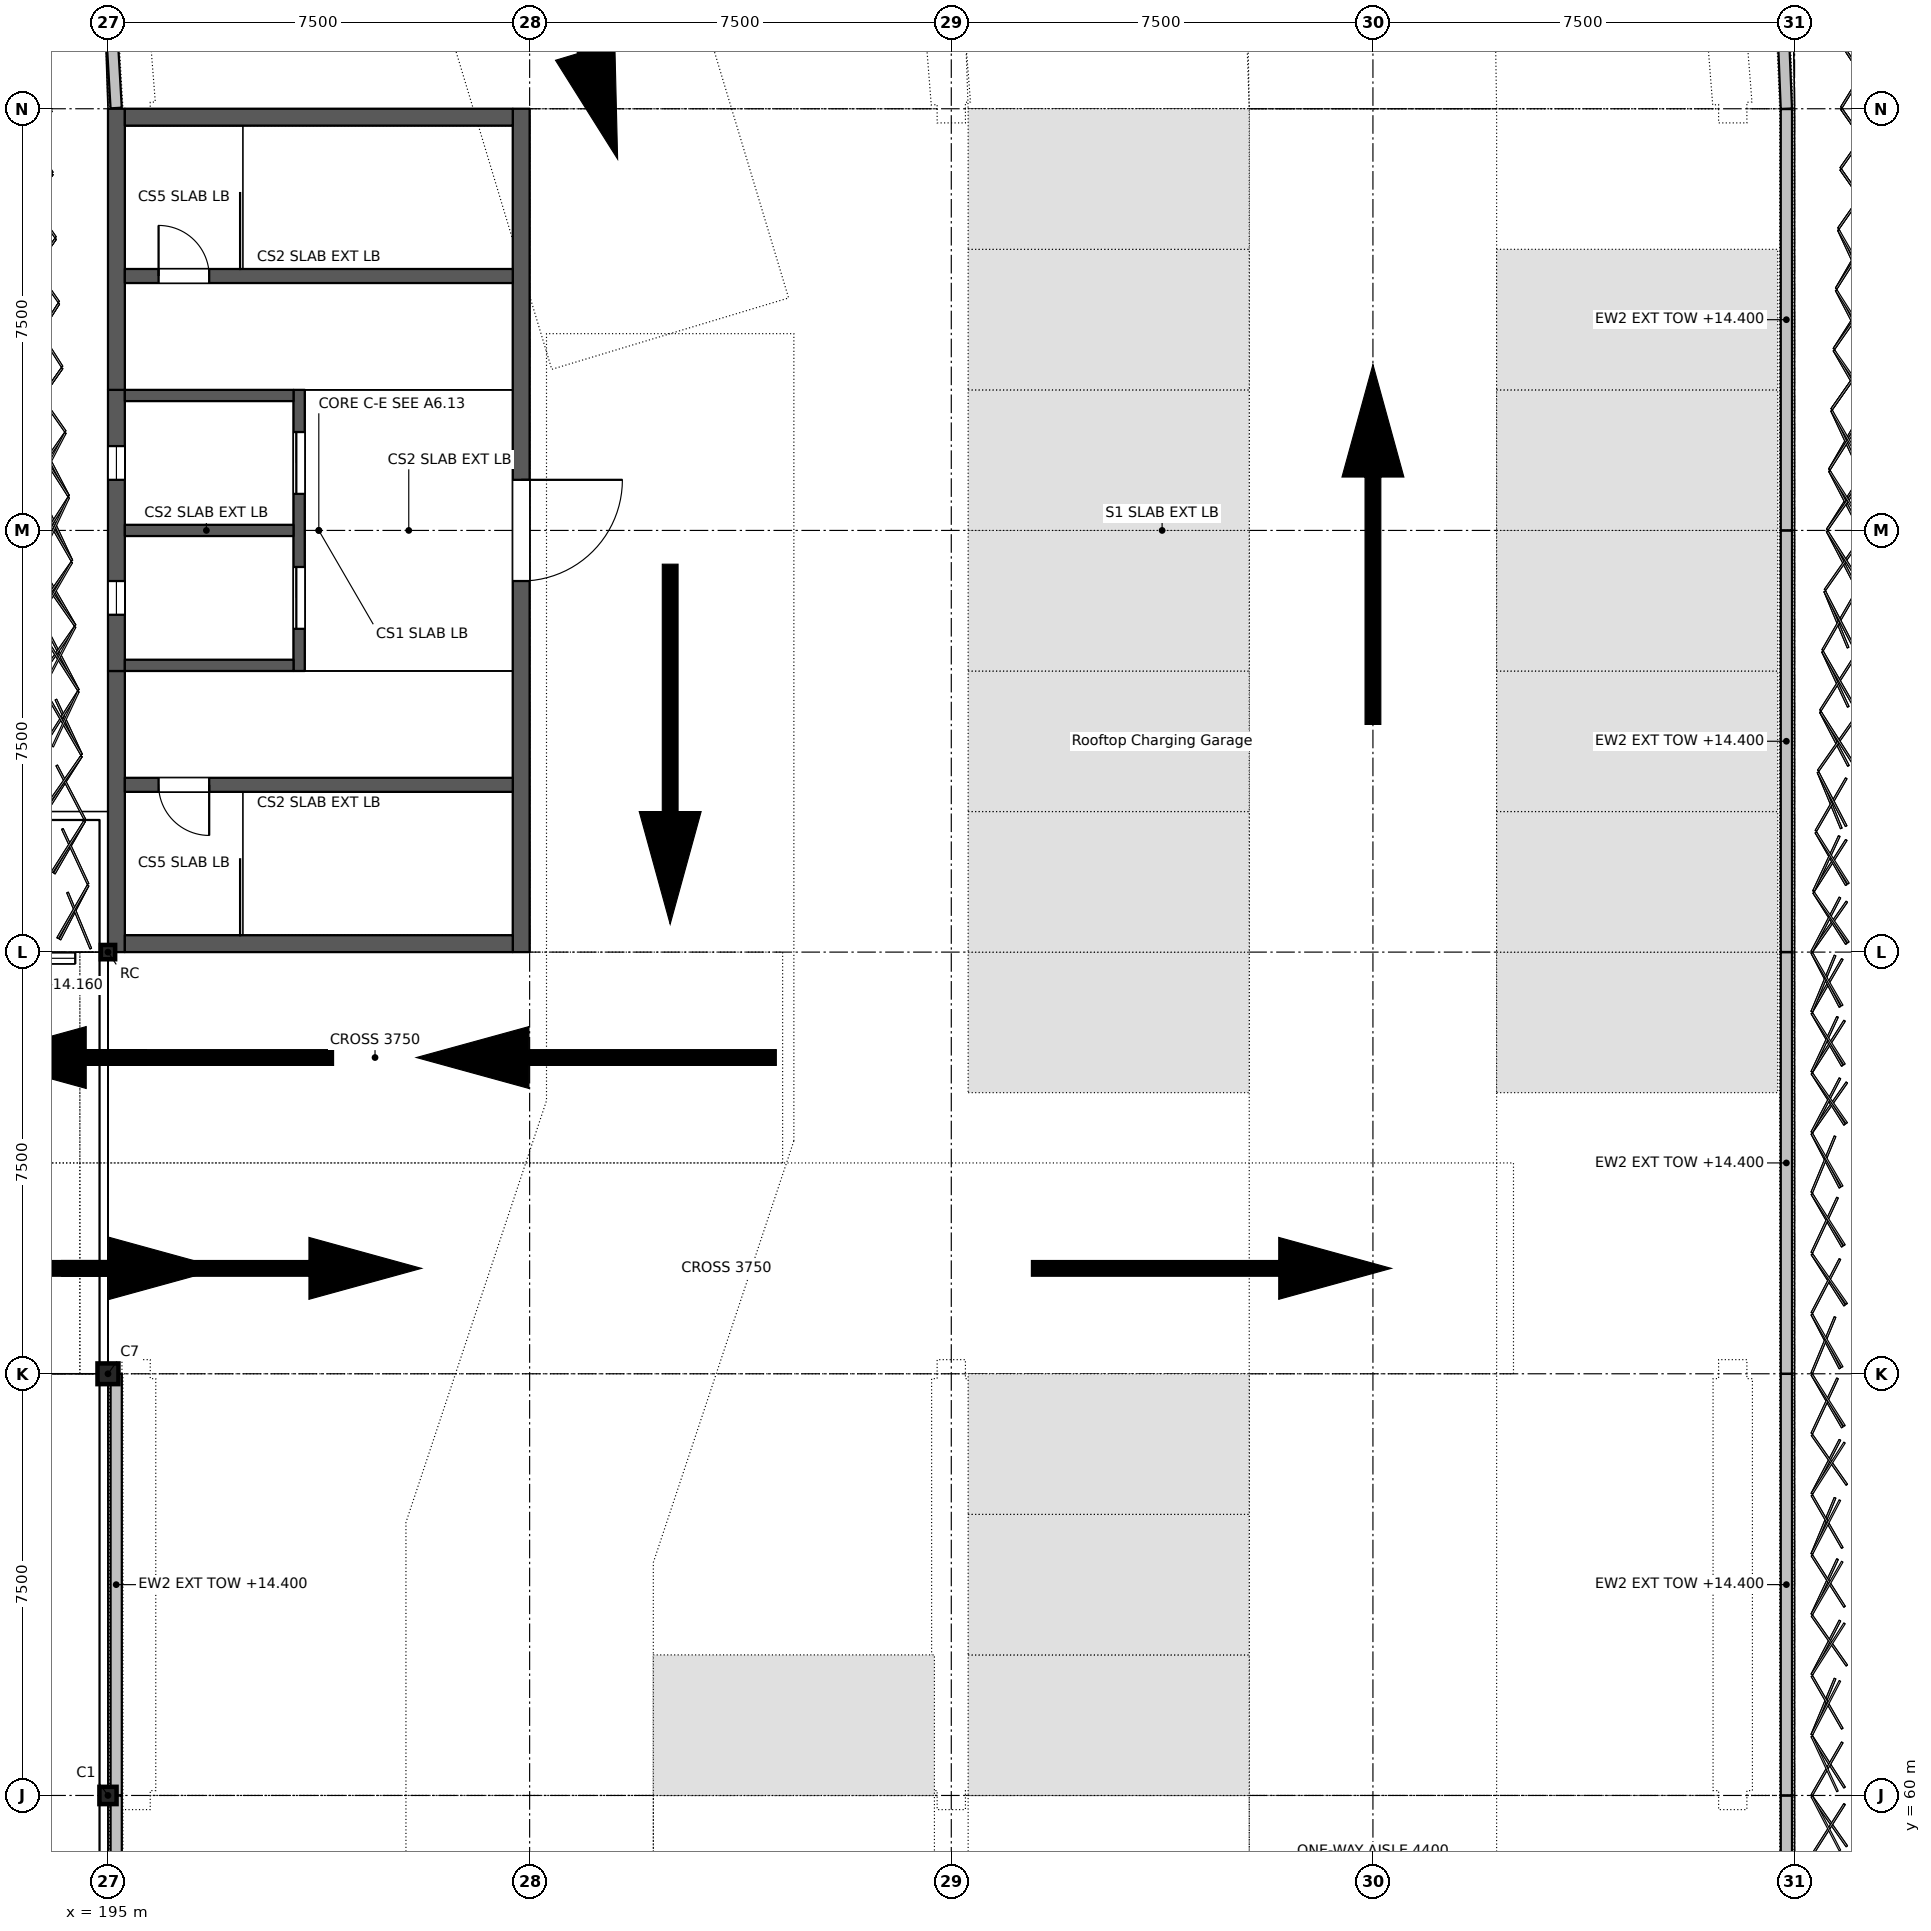
"""IFC4 building model, lengths in metres.
Left out: names, types, materials, properties, quantities, classifications, styles, units other than length and angle.
Written with IfcOpenShell. Run it as: python <this file> out.ifc"""

import sys

from ifc_helpers import new_model, si_unit, direction, frame, frame_2d, origin, origin_2d, place, context, subcontext, project, spatial, polyline, rectangle, hollow_rectangle, i_section, outline, extrude, element, fill, save


model = new_model("IFC4")
c1 = context("Model", 3, precision=1e-05, world=origin(), true_north=direction((0.0, 1.0)))
c2 = subcontext(c1, "Body", "Model", "MODEL_VIEW")
j1 = project(units=[si_unit("LENGTHUNIT", "METRE"), si_unit("PLANEANGLEUNIT", "RADIAN")], contexts=[c1])
p1 = place(None, origin())
s1 = spatial("IfcSite", under=j1, at=p1, CompositionType="ELEMENT")
p2 = place(p1, origin())
s2 = spatial("IfcBuilding", under=s1, at=p2, CompositionType="ELEMENT")
p3 = place(p2, frame((0.0, 0.0, 13.2)))
s3 = spatial("IfcBuildingStorey", under=s2, at=p3, CompositionType="ELEMENT", Elevation=13.2)
p4 = place(p3, frame((195.0, 60.0, 0.0), z_axis=(0.0, 0.0, 1.0), x_axis=(1.0, 0.0, 0.0)))
e1 = element("IfcColumn", 1, at=p4, inside=s3, PredefinedType="COLUMN", context=c2, shape_type="SweptSolid", body=[
    extrude(i_section(OverallWidth=0.305, OverallDepth=0.307, WebThickness=0.01, FlangeThickness=0.015, FilletRadius=0.015, at=origin_2d()), origin(), (0.0, 0.0, 1.0), 3.8),
])
p5 = place(p3, frame((195.0, 67.5, 0.0), z_axis=(0.0, 0.0, 1.0), x_axis=(1.0, 0.0, 0.0)))
e2 = element("IfcColumn", 2, at=p5, inside=s3, PredefinedType="COLUMN", context=c2, shape_type="SweptSolid", body=[
    extrude(i_section(OverallWidth=0.373, OverallDepth=0.368, WebThickness=0.015, FlangeThickness=0.024, FilletRadius=0.015, at=origin_2d()), origin(), (0.0, 0.0, 1.0), 3.8),
])
p6 = place(p3, frame((195.0, 75.0, 0.0), z_axis=(0.0, 0.0, 1.0), x_axis=(1.0, 0.0, 0.0)))
e3 = element("IfcColumn", 3, at=p6, inside=s3, PredefinedType="COLUMN", context=c2, shape_type="SweptSolid", body=[
    extrude(hollow_rectangle(XDim=0.254, YDim=0.254, WallThickness=0.013, at=origin_2d()), origin(), (0.0, 0.0, 1.0), 3.8),
])
p7 = place(p3, frame((195.011, 92.355, 0.0), z_axis=(0.0, 0.0, 1.0), x_axis=(0.057331289228, -0.998355208969, 0.0)))
e4 = element("IfcWall", 4, at=p7, inside=s3, PredefinedType="SOLIDWALL", context=c2, shape_type="SweptSolid", body=[
    extrude(rectangle(XDim=2.346, YDim=0.2, at=frame_2d((1.173, 0.0))), origin(), (0.0, 0.0, 1.0), 1.2),
])
for number, where, z_axis, x_axis in (
    (5, (195.146, 67.498, 0.0), (0.0, 0.0, 1.0), (0.0, -1.0, 0.0)),
    (6, (195.146, 59.998, 0.0), (0.0, 0.0, 1.0), (0.0, -1.0, 0.0)),
):
    element("IfcWall", number, at=place(p3, frame(where, z_axis=z_axis, x_axis=x_axis)), inside=s3, PredefinedType="SOLIDWALL", context=c2, shape_type="SweptSolid", body=[
        extrude(rectangle(XDim=7.496, YDim=0.2, at=frame_2d((3.748, 0.0))), origin(), (0.0, 0.0, 1.0), 1.2),
    ])
for number, where, z_axis, x_axis in (
    (7, (224.854, 52.502, 0.0), (0.0, 0.0, 1.0), (0.0, 1.0, 0.0)),
    (8, (224.854, 60.002, 0.0), (0.0, 0.0, 1.0), (0.0, 1.0, 0.0)),
    (9, (224.854, 67.502, 0.0), (0.0, 0.0, 1.0), (0.0, 1.0, 0.0)),
    (10, (224.854, 75.002, 0.0), (0.0, 0.0, 1.0), (0.0, 1.0, 0.0)),
):
    element("IfcWall", number, at=place(p3, frame(where, z_axis=z_axis, x_axis=x_axis)), inside=s3, PredefinedType="SOLIDWALL", context=c2, shape_type="SweptSolid", body=[
        extrude(rectangle(XDim=7.496, YDim=0.2, at=frame_2d((3.748, 0.0))), origin(), (0.0, 0.0, 1.0), 1.2),
    ])
p8 = place(p3, frame((224.854, 82.502, 0.0), z_axis=(0.0, 0.0, 1.0), x_axis=(0.0, 1.0, 0.0)))
e11 = element("IfcWall", 11, at=p8, inside=s3, PredefinedType="SOLIDWALL", context=c2, shape_type="SweptSolid", body=[
    extrude(rectangle(XDim=7.492, YDim=0.2, at=frame_2d((3.746, 0.0))), origin(), (0.0, 0.0, 1.0), 1.2),
])
p9 = place(p3, frame((224.854, 90.0, 0.0), z_axis=(0.0, 0.0, 1.0), x_axis=(-0.040205559905, 0.999191429583, 0.0)))
e12 = element("IfcWall", 12, at=p9, inside=s3, PredefinedType="SOLIDWALL", context=c2, shape_type="SweptSolid", body=[
    extrude(rectangle(XDim=4.105, YDim=0.2, at=frame_2d((2.052, 0.0))), origin(), (0.0, 0.0, 1.0), 1.2),
])
p10 = place(p2, frame((0.0, 0.0, 9.9)))
s4 = spatial("IfcBuildingStorey", under=s2, at=p10, CompositionType="ELEMENT", Elevation=9.9)
p11 = place(p10, frame((187.654, 74.89, 3.16), z_axis=(0.0, 0.0, 1.0), x_axis=(1.0, 0.0, 0.0)))
e13 = element("IfcWall", 13, at=p11, inside=s4, PredefinedType="SOLIDWALL", context=c2, shape_type="SweptSolid", body=[
    extrude(rectangle(XDim=7.219, YDim=0.2, at=frame_2d((3.61, 0.0))), origin(), (0.0, 0.0, 1.0), 4.514),
])
p12 = place(p11, frame((0.455, 0.0, 1.1)))
e14 = element("IfcOpeningElement", 14, at=p12, cuts=e13, PredefinedType="OPENING", context=c2, shape_type="SweptSolid", body=[
    extrude(rectangle(XDim=1.8, YDim=1.4, at=frame_2d((0.9, 0.7))), frame((0.0, 0.11, 0.0), z_axis=(0.0, -1.0, 0.0), x_axis=(1.0, 0.0, 0.0)), (0.0, 0.0, 1.0), 0.22),
])
p13 = place(p11, frame((2.71, 0.0, 1.1)))
e15 = element("IfcOpeningElement", 15, at=p13, cuts=e13, PredefinedType="OPENING", context=c2, shape_type="SweptSolid", body=[
    extrude(rectangle(XDim=1.8, YDim=1.4, at=frame_2d((0.9, 0.7))), frame((0.0, 0.11, 0.0), z_axis=(0.0, -1.0, 0.0), x_axis=(1.0, 0.0, 0.0)), (0.0, 0.0, 1.0), 0.22),
])
p14 = place(p11, frame((4.965, 0.0, 1.1)))
e16 = element("IfcOpeningElement", 16, at=p14, cuts=e13, PredefinedType="OPENING", context=c2, shape_type="SweptSolid", body=[
    extrude(rectangle(XDim=1.8, YDim=1.4, at=frame_2d((0.9, 0.7))), frame((0.0, 0.11, 0.0), z_axis=(0.0, -1.0, 0.0), x_axis=(1.0, 0.0, 0.0)), (0.0, 0.0, 1.0), 0.22),
])
p15 = place(p3, frame((202.35, 90.0, 0.0), z_axis=(0.0, 0.0, 1.0), x_axis=(0.0, -1.0, 0.0)))
e17 = element("IfcWall", 17, at=p15, inside=s3, PredefinedType="SHEAR", context=c2, shape_type="SweptSolid", body=[
    extrude(rectangle(XDim=15.0, YDim=0.3, at=frame_2d((7.5, 0.0))), origin(), (0.0, 0.0, 1.0), 3.3),
])
p16 = place(p15, frame((6.6, 0.0, 0.0)))
e18 = element("IfcOpeningElement", 18, at=p16, cuts=e17, PredefinedType="OPENING", context=c2, shape_type="SweptSolid", body=[
    extrude(rectangle(XDim=1.8, YDim=2.1, at=frame_2d((0.9, 1.05))), frame((0.0, 0.16, 0.0), z_axis=(0.0, -1.0, 0.0), x_axis=(1.0, 0.0, 0.0)), (0.0, 0.0, 1.0), 0.32),
])
p17 = place(p3, frame((195.15, 75.0, 0.0), z_axis=(0.0, 0.0, 1.0), x_axis=(0.0, 1.0, 0.0)))
e19 = element("IfcWall", 19, at=p17, inside=s3, PredefinedType="SHEAR", context=c2, shape_type="SweptSolid", body=[
    extrude(rectangle(XDim=5.0, YDim=0.3, at=frame_2d((2.5, 0.0))), origin(), (0.0, 0.0, 1.0), 3.875),
])
p18 = place(p3, frame((195.15, 80.0, 0.0), z_axis=(0.0, 0.0, 1.0), x_axis=(0.0, 1.0, 0.0)))
e20 = element("IfcWall", 20, at=p18, inside=s3, PredefinedType="SHEAR", context=c2, shape_type="SweptSolid", body=[
    extrude(outline(polyline([(0.0, 0.0), (5.0, 0.0), (5.0, 7.8), (0.0, 4.8), (0.0, 0.0)])), frame((0.0, 0.15, 0.0), z_axis=(0.0, -1.0, 0.0), x_axis=(1.0, 0.0, 0.0)), (0.0, 0.0, 1.0), 0.3),
])
p19 = place(p18, frame((1.0, 0.0, 0.3)))
e21 = element("IfcOpeningElement", 21, at=p19, cuts=e20, PredefinedType="OPENING", context=c2, shape_type="SweptSolid", body=[
    extrude(rectangle(XDim=0.6, YDim=2.7, at=frame_2d((0.3, 1.35))), frame((0.0, 0.16, 0.0), z_axis=(0.0, -1.0, 0.0), x_axis=(1.0, 0.0, 0.0)), (0.0, 0.0, 1.0), 0.32),
])
p20 = place(p18, frame((3.4, 0.0, 0.3)))
e22 = element("IfcOpeningElement", 22, at=p20, cuts=e20, PredefinedType="OPENING", context=c2, shape_type="SweptSolid", body=[
    extrude(rectangle(XDim=0.6, YDim=2.7, at=frame_2d((0.3, 1.35))), frame((0.0, 0.16, 0.0), z_axis=(0.0, -1.0, 0.0), x_axis=(1.0, 0.0, 0.0)), (0.0, 0.0, 1.0), 0.32),
])
p21 = place(p3, frame((195.15, 85.0, 0.0), z_axis=(0.0, 0.0, 1.0), x_axis=(0.0, 1.0, 0.0)))
e23 = element("IfcWall", 23, at=p21, inside=s3, PredefinedType="SHEAR", context=c2, shape_type="SweptSolid", body=[
    extrude(rectangle(XDim=5.0, YDim=0.3, at=frame_2d((2.5, 0.0))), origin(), (0.0, 0.0, 1.0), 3.875),
])
for number, where, z_axis, x_axis in (
    (24, (202.2, 75.15, 0.0), (0.0, 0.0, 1.0), (-1.0, 0.0, 0.0)),
    (25, (202.2, 89.85, 0.0), (0.0, 0.0, 1.0), (-1.0, 0.0, 0.0)),
):
    element("IfcWall", number, at=place(p3, frame(where, z_axis=z_axis, x_axis=x_axis)), inside=s3, PredefinedType="SHEAR", context=c2, shape_type="SweptSolid", body=[
        extrude(outline(polyline([(0.0, 0.0), (6.9, 0.0), (6.9, 3.875), (0.0, 3.3), (0.0, 0.0)])), frame((0.0, 0.15, 0.0), z_axis=(0.0, -1.0, 0.0), x_axis=(1.0, 0.0, 0.0)), (0.0, 0.0, 1.0), 0.3),
    ])
p22 = place(p3, frame((202.2, 77.975, 0.0), z_axis=(0.0, 0.0, 1.0), x_axis=(-1.0, 0.0, 0.0)))
e26 = element("IfcWall", 26, at=p22, inside=s3, PredefinedType="STANDARD", context=c2, shape_type="SweptSolid", body=[
    extrude(outline(polyline([(0.0, 0.0), (6.9, 0.0), (6.9, 3.675), (0.0, 3.1), (0.0, 0.0)])), frame((0.0, 0.125, 0.0), z_axis=(0.0, -1.0, 0.0), x_axis=(1.0, 0.0, 0.0)), (0.0, 0.0, 1.0), 0.25),
])
p23 = place(p22, frame((5.4, 0.0, 0.0)))
e27 = element("IfcOpeningElement", 27, at=p23, cuts=e26, PredefinedType="OPENING", context=c2, shape_type="SweptSolid", body=[
    extrude(rectangle(XDim=0.9, YDim=2.1, at=frame_2d((0.45, 1.05))), frame((0.0, 0.135, 0.0), z_axis=(0.0, -1.0, 0.0), x_axis=(1.0, 0.0, 0.0)), (0.0, 0.0, 1.0), 0.27),
])
p24 = place(p3, frame((195.3, 87.025, 0.0), z_axis=(0.0, 0.0, 1.0), x_axis=(1.0, 0.0, 0.0)))
e28 = element("IfcWall", 28, at=p24, inside=s3, PredefinedType="STANDARD", context=c2, shape_type="SweptSolid", body=[
    extrude(outline(polyline([(0.0, 0.0), (6.9, 0.0), (6.9, 3.1), (0.0, 3.675), (0.0, 0.0)])), frame((0.0, 0.125, 0.0), z_axis=(0.0, -1.0, 0.0), x_axis=(1.0, 0.0, 0.0)), (0.0, 0.0, 1.0), 0.25),
])
p25 = place(p24, frame((0.6, 0.0, 0.0)))
e29 = element("IfcOpeningElement", 29, at=p25, cuts=e28, PredefinedType="OPENING", context=c2, shape_type="SweptSolid", body=[
    extrude(rectangle(XDim=0.9, YDim=2.1, at=frame_2d((0.45, 1.05))), frame((0.0, 0.135, 0.0), z_axis=(0.0, -1.0, 0.0), x_axis=(1.0, 0.0, 0.0)), (0.0, 0.0, 1.0), 0.27),
])
p26 = place(p3, frame((198.4, 80.0, 0.0), z_axis=(0.0, 0.0, 1.0), x_axis=(0.0, 1.0, 0.0)))
e30 = element("IfcWall", 30, at=p26, inside=s3, PredefinedType="STANDARD", context=c2, shape_type="SweptSolid", body=[
    extrude(outline(polyline([(0.0, 0.0), (5.0, 0.0), (5.0, 7.8), (0.0, 4.8), (0.0, 0.0)])), frame((0.0, 0.1, 0.0), z_axis=(0.0, -1.0, 0.0), x_axis=(1.0, 0.0, 0.0)), (0.0, 0.0, 1.0), 0.2),
])
p27 = place(p26, frame((0.75, 0.0, 0.0)))
e31 = element("IfcOpeningElement", 31, at=p27, cuts=e30, PredefinedType="OPENING", context=c2, shape_type="SweptSolid", body=[
    extrude(rectangle(XDim=1.1, YDim=2.1, at=frame_2d((0.55, 1.05))), frame((0.0, 0.11, 0.0), z_axis=(0.0, -1.0, 0.0), x_axis=(1.0, 0.0, 0.0)), (0.0, 0.0, 1.0), 0.22),
])
p28 = place(p26, frame((3.15, 0.0, 0.0)))
e32 = element("IfcOpeningElement", 32, at=p28, cuts=e30, PredefinedType="OPENING", context=c2, shape_type="SweptSolid", body=[
    extrude(rectangle(XDim=1.1, YDim=2.1, at=frame_2d((0.55, 1.05))), frame((0.0, 0.11, 0.0), z_axis=(0.0, -1.0, 0.0), x_axis=(1.0, 0.0, 0.0)), (0.0, 0.0, 1.0), 0.22),
])
p29 = place(p3, frame((198.3, 80.1, 0.0), z_axis=(0.0, 0.0, 1.0), x_axis=(-1.0, 0.0, 0.0)))
e33 = element("IfcWall", 33, at=p29, inside=s3, PredefinedType="STANDARD", context=c2, shape_type="SweptSolid", body=[
    extrude(rectangle(XDim=3.0, YDim=0.2, at=frame_2d((1.5, 0.0))), origin(), (0.0, 0.0, 1.0), 4.8),
])
p30 = place(p3, frame((198.3, 82.5, 0.0), z_axis=(0.0, 0.0, 1.0), x_axis=(-1.0, 0.0, 0.0)))
e34 = element("IfcWall", 34, at=p30, inside=s3, PredefinedType="STANDARD", context=c2, shape_type="SweptSolid", body=[
    extrude(rectangle(XDim=3.0, YDim=0.2, at=frame_2d((1.5, 0.0))), origin(), (0.0, 0.0, 1.0), 6.24),
])
p31 = place(p3, frame((198.3, 84.9, 0.0), z_axis=(0.0, 0.0, 1.0), x_axis=(-1.0, 0.0, 0.0)))
e35 = element("IfcWall", 35, at=p31, inside=s3, PredefinedType="STANDARD", context=c2, shape_type="SweptSolid", body=[
    extrude(rectangle(XDim=3.0, YDim=0.2, at=frame_2d((1.5, 0.0))), origin(), (0.0, 0.0, 1.0), 7.68),
])
p32 = place(p14, origin())
e36 = element("IfcWindow", 36, at=p32, inside=s3, PartitioningType="SINGLE_PANEL", PredefinedType="WINDOW", context=c2, shape_type="SweptSolid", body=[
    extrude(rectangle(XDim=1.8, YDim=1.4, at=frame_2d((0.9, 0.7))), frame((0.0, 0.03, 0.0), z_axis=(0.0, -1.0, 0.0), x_axis=(1.0, 0.0, 0.0)), (0.0, 0.0, 1.0), 0.06),
])
fill(e16, e36)
p33 = place(p16, origin())
e37 = element("IfcDoor", 37, at=p33, inside=s3, OperationType="DOUBLE_DOOR_SINGLE_SWING", PredefinedType="DOOR", context=c2, shape_type="SweptSolid", body=[
    extrude(rectangle(XDim=1.8, YDim=2.1, at=frame_2d((0.9, 1.05))), frame((0.0, 0.025, 0.0), z_axis=(0.0, -1.0, 0.0), x_axis=(1.0, 0.0, 0.0)), (0.0, 0.0, 1.0), 0.05),
])
fill(e18, e37)
p34 = place(p23, origin())
e38 = element("IfcDoor", 38, at=p34, inside=s3, OperationType="SINGLE_SWING_LEFT", PredefinedType="DOOR", context=c2, shape_type="SweptSolid", body=[
    extrude(rectangle(XDim=0.9, YDim=2.1, at=frame_2d((0.45, 1.05))), frame((0.0, 0.025, 0.0), z_axis=(0.0, -1.0, 0.0), x_axis=(1.0, 0.0, 0.0)), (0.0, 0.0, 1.0), 0.05),
])
fill(e27, e38)
p35 = place(p25, origin())
e39 = element("IfcDoor", 39, at=p35, inside=s3, OperationType="SINGLE_SWING_RIGHT", PredefinedType="DOOR", context=c2, shape_type="SweptSolid", body=[
    extrude(rectangle(XDim=0.9, YDim=2.1, at=frame_2d((0.45, 1.05))), frame((0.0, 0.025, 0.0), z_axis=(0.0, -1.0, 0.0), x_axis=(1.0, 0.0, 0.0)), (0.0, 0.0, 1.0), 0.05),
])
fill(e29, e39)
p36 = place(p27, origin())
e40 = element("IfcDoor", 40, at=p36, inside=s3, OperationType="DOUBLE_DOOR_SLIDING", PredefinedType="DOOR", context=c2, shape_type="SweptSolid", body=[
    extrude(rectangle(XDim=1.1, YDim=2.1, at=frame_2d((0.55, 1.05))), frame((0.0, 0.025, 0.0), z_axis=(0.0, -1.0, 0.0), x_axis=(1.0, 0.0, 0.0)), (0.0, 0.0, 1.0), 0.05),
])
fill(e31, e40)
p37 = place(p28, origin())
e41 = element("IfcDoor", 41, at=p37, inside=s3, OperationType="DOUBLE_DOOR_SLIDING", PredefinedType="DOOR", context=c2, shape_type="SweptSolid", body=[
    extrude(rectangle(XDim=1.1, YDim=2.1, at=frame_2d((0.55, 1.05))), frame((0.0, 0.025, 0.0), z_axis=(0.0, -1.0, 0.0), x_axis=(1.0, 0.0, 0.0)), (0.0, 0.0, 1.0), 0.05),
])
fill(e32, e41)
p38 = place(p19, origin())
e42 = element("IfcWindow", 42, at=p38, inside=s3, PartitioningType="SINGLE_PANEL", PredefinedType="WINDOW", context=c2, shape_type="SweptSolid", body=[
    extrude(rectangle(XDim=0.6, YDim=2.7, at=frame_2d((0.3, 1.35))), frame((0.0, 0.03, 0.0), z_axis=(0.0, -1.0, 0.0), x_axis=(1.0, 0.0, 0.0)), (0.0, 0.0, 1.0), 0.06),
])
fill(e21, e42)
p39 = place(p20, origin())
e43 = element("IfcWindow", 43, at=p39, inside=s3, PartitioningType="SINGLE_PANEL", PredefinedType="WINDOW", context=c2, shape_type="SweptSolid", body=[
    extrude(rectangle(XDim=0.6, YDim=2.7, at=frame_2d((0.3, 1.35))), frame((0.0, 0.03, 0.0), z_axis=(0.0, -1.0, 0.0), x_axis=(1.0, 0.0, 0.0)), (0.0, 0.0, 1.0), 0.06),
])
fill(e22, e43)
save(model, sys.argv[1])
